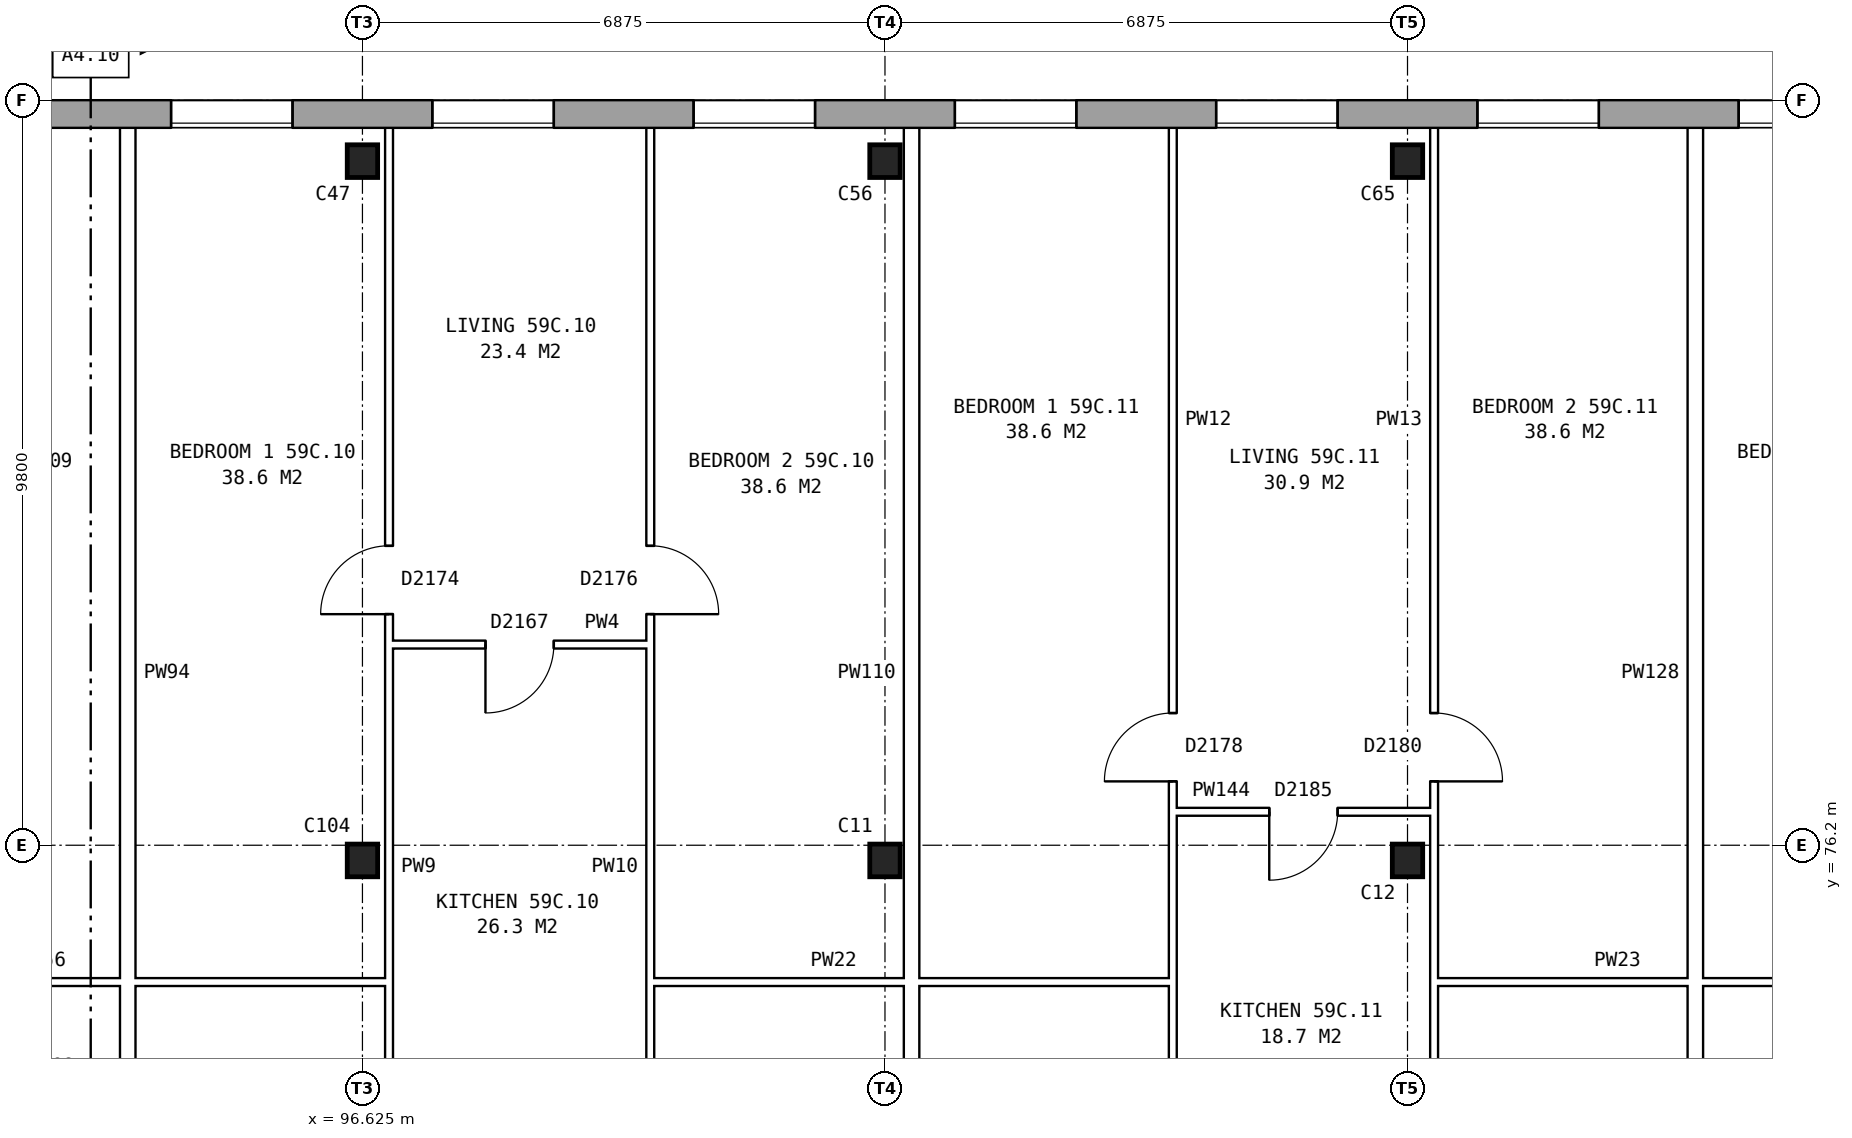
"""IFC4 building model, lengths in metres.
Left out: names, types, materials, properties, quantities, classifications, styles, units other than length and angle.
Written with IfcOpenShell. Run it as: python <this file> out.ifc"""

import sys

from ifc_helpers import new_model, si_unit, direction, frame, frame_2d, origin, origin_2d, place, context, subcontext, project, spatial, rectangle, i_section, extrude, element, fill, save


model = new_model("IFC4")
c1 = context("Model", 3, precision=1e-05, world=origin(), true_north=direction((0.0, 1.0)))
c2 = subcontext(c1, "Body", "Model", "MODEL_VIEW")
j1 = project(units=[si_unit("LENGTHUNIT", "METRE"), si_unit("PLANEANGLEUNIT", "RADIAN")], contexts=[c1])
p1 = place(None, origin())
s1 = spatial("IfcSite", under=j1, at=p1, CompositionType="ELEMENT")
p2 = place(p1, origin())
s2 = spatial("IfcBuilding", under=s1, at=p2, CompositionType="ELEMENT")
p3 = place(p2, frame((0.0, 0.0, 209.0)))
s3 = spatial("IfcBuildingStorey", under=s2, at=p3, CompositionType="ELEMENT", Elevation=209.0)
for number, where, z_axis, x_axis in (
    (1, (96.625, 76.0, 0.0), (0.0, 0.0, 1.0), (1.0, 0.0, 0.0)),
    (2, (103.5, 76.0, 0.0), (0.0, 0.0, 1.0), (1.0, 0.0, 0.0)),
    (3, (110.375, 76.0, 0.0), (0.0, 0.0, 1.0), (1.0, 0.0, 0.0)),
    (4, (96.625, 85.2, 0.0), (0.0, 0.0, 1.0), (1.0, 0.0, 0.0)),
    (5, (103.5, 85.2, 0.0), (0.0, 0.0, 1.0), (1.0, 0.0, 0.0)),
    (6, (110.375, 85.2, 0.0), (0.0, 0.0, 1.0), (1.0, 0.0, 0.0)),
):
    element("IfcColumn", number, at=place(p3, frame(where, z_axis=z_axis, x_axis=x_axis)), inside=s3, PredefinedType="COLUMN", context=c2, shape_type="SweptSolid", body=[
        extrude(i_section(OverallWidth=0.4, OverallDepth=0.43, WebThickness=0.04, FlangeThickness=0.04, at=origin_2d()), origin(), (0.0, 0.0, 1.0), 2.85),
    ])
p4 = place(p3, frame((131.05, 85.82, 0.0), z_axis=(0.0, 0.0, 1.0), x_axis=(-1.0, 0.0, 0.0)))
e7 = element("IfcWall", 7, at=p4, inside=s3, PredefinedType="STANDARD", context=c2, shape_type="SweptSolid", body=[
    extrude(rectangle(XDim=55.1, YDim=0.36, at=frame_2d((27.55, 0.0))), origin(), (0.0, 0.0, 1.0), 2.85),
])
p5 = place(p4, frame((0.969, 0.0, 0.8)))
e8 = element("IfcOpeningElement", 8, at=p5, cuts=e7, PredefinedType="OPENING", context=c2, shape_type="SweptSolid", body=[
    extrude(rectangle(XDim=1.6, YDim=1.8, at=frame_2d((0.8, 0.9))), frame((0.0, 0.19, 0.0), z_axis=(0.0, -1.0, 0.0), x_axis=(1.0, 0.0, 0.0)), (0.0, 0.0, 1.0), 0.38),
])
p6 = place(p4, frame((4.406, 0.0, 0.8)))
e9 = element("IfcOpeningElement", 9, at=p6, cuts=e7, PredefinedType="OPENING", context=c2, shape_type="SweptSolid", body=[
    extrude(rectangle(XDim=1.6, YDim=1.8, at=frame_2d((0.8, 0.9))), frame((0.0, 0.19, 0.0), z_axis=(0.0, -1.0, 0.0), x_axis=(1.0, 0.0, 0.0)), (0.0, 0.0, 1.0), 0.38),
])
p7 = place(p4, frame((7.844, 0.0, 0.8)))
e10 = element("IfcOpeningElement", 10, at=p7, cuts=e7, PredefinedType="OPENING", context=c2, shape_type="SweptSolid", body=[
    extrude(rectangle(XDim=1.6, YDim=1.8, at=frame_2d((0.8, 0.9))), frame((0.0, 0.19, 0.0), z_axis=(0.0, -1.0, 0.0), x_axis=(1.0, 0.0, 0.0)), (0.0, 0.0, 1.0), 0.38),
])
p8 = place(p4, frame((11.281, 0.0, 0.8)))
e11 = element("IfcOpeningElement", 11, at=p8, cuts=e7, PredefinedType="OPENING", context=c2, shape_type="SweptSolid", body=[
    extrude(rectangle(XDim=1.6, YDim=1.8, at=frame_2d((0.8, 0.9))), frame((0.0, 0.19, 0.0), z_axis=(0.0, -1.0, 0.0), x_axis=(1.0, 0.0, 0.0)), (0.0, 0.0, 1.0), 0.38),
])
p9 = place(p4, frame((14.719, 0.0, 0.8)))
e12 = element("IfcOpeningElement", 12, at=p9, cuts=e7, PredefinedType="OPENING", context=c2, shape_type="SweptSolid", body=[
    extrude(rectangle(XDim=1.6, YDim=1.8, at=frame_2d((0.8, 0.9))), frame((0.0, 0.19, 0.0), z_axis=(0.0, -1.0, 0.0), x_axis=(1.0, 0.0, 0.0)), (0.0, 0.0, 1.0), 0.38),
])
p10 = place(p4, frame((18.156, 0.0, 0.8)))
e13 = element("IfcOpeningElement", 13, at=p10, cuts=e7, PredefinedType="OPENING", context=c2, shape_type="SweptSolid", body=[
    extrude(rectangle(XDim=1.6, YDim=1.8, at=frame_2d((0.8, 0.9))), frame((0.0, 0.19, 0.0), z_axis=(0.0, -1.0, 0.0), x_axis=(1.0, 0.0, 0.0)), (0.0, 0.0, 1.0), 0.38),
])
p11 = place(p4, frame((21.594, 0.0, 0.8)))
e14 = element("IfcOpeningElement", 14, at=p11, cuts=e7, PredefinedType="OPENING", context=c2, shape_type="SweptSolid", body=[
    extrude(rectangle(XDim=1.6, YDim=1.8, at=frame_2d((0.8, 0.9))), frame((0.0, 0.19, 0.0), z_axis=(0.0, -1.0, 0.0), x_axis=(1.0, 0.0, 0.0)), (0.0, 0.0, 1.0), 0.38),
])
p12 = place(p4, frame((25.031, 0.0, 0.8)))
e15 = element("IfcOpeningElement", 15, at=p12, cuts=e7, PredefinedType="OPENING", context=c2, shape_type="SweptSolid", body=[
    extrude(rectangle(XDim=1.6, YDim=1.8, at=frame_2d((0.8, 0.9))), frame((0.0, 0.19, 0.0), z_axis=(0.0, -1.0, 0.0), x_axis=(1.0, 0.0, 0.0)), (0.0, 0.0, 1.0), 0.38),
])
p13 = place(p4, frame((28.469, 0.0, 0.8)))
e16 = element("IfcOpeningElement", 16, at=p13, cuts=e7, PredefinedType="OPENING", context=c2, shape_type="SweptSolid", body=[
    extrude(rectangle(XDim=1.6, YDim=1.8, at=frame_2d((0.8, 0.9))), frame((0.0, 0.19, 0.0), z_axis=(0.0, -1.0, 0.0), x_axis=(1.0, 0.0, 0.0)), (0.0, 0.0, 1.0), 0.38),
])
p14 = place(p4, frame((31.906, 0.0, 0.8)))
e17 = element("IfcOpeningElement", 17, at=p14, cuts=e7, PredefinedType="OPENING", context=c2, shape_type="SweptSolid", body=[
    extrude(rectangle(XDim=1.6, YDim=1.8, at=frame_2d((0.8, 0.9))), frame((0.0, 0.19, 0.0), z_axis=(0.0, -1.0, 0.0), x_axis=(1.0, 0.0, 0.0)), (0.0, 0.0, 1.0), 0.38),
])
p15 = place(p4, frame((35.344, 0.0, 0.8)))
e18 = element("IfcOpeningElement", 18, at=p15, cuts=e7, PredefinedType="OPENING", context=c2, shape_type="SweptSolid", body=[
    extrude(rectangle(XDim=1.6, YDim=1.8, at=frame_2d((0.8, 0.9))), frame((0.0, 0.19, 0.0), z_axis=(0.0, -1.0, 0.0), x_axis=(1.0, 0.0, 0.0)), (0.0, 0.0, 1.0), 0.38),
])
p16 = place(p4, frame((38.781, 0.0, 0.8)))
e19 = element("IfcOpeningElement", 19, at=p16, cuts=e7, PredefinedType="OPENING", context=c2, shape_type="SweptSolid", body=[
    extrude(rectangle(XDim=1.6, YDim=1.8, at=frame_2d((0.8, 0.9))), frame((0.0, 0.19, 0.0), z_axis=(0.0, -1.0, 0.0), x_axis=(1.0, 0.0, 0.0)), (0.0, 0.0, 1.0), 0.38),
])
p17 = place(p4, frame((42.219, 0.0, 0.8)))
e20 = element("IfcOpeningElement", 20, at=p17, cuts=e7, PredefinedType="OPENING", context=c2, shape_type="SweptSolid", body=[
    extrude(rectangle(XDim=1.6, YDim=1.8, at=frame_2d((0.8, 0.9))), frame((0.0, 0.19, 0.0), z_axis=(0.0, -1.0, 0.0), x_axis=(1.0, 0.0, 0.0)), (0.0, 0.0, 1.0), 0.38),
])
p18 = place(p4, frame((45.656, 0.0, 0.8)))
e21 = element("IfcOpeningElement", 21, at=p18, cuts=e7, PredefinedType="OPENING", context=c2, shape_type="SweptSolid", body=[
    extrude(rectangle(XDim=1.6, YDim=1.8, at=frame_2d((0.8, 0.9))), frame((0.0, 0.19, 0.0), z_axis=(0.0, -1.0, 0.0), x_axis=(1.0, 0.0, 0.0)), (0.0, 0.0, 1.0), 0.38),
])
p19 = place(p4, frame((49.094, 0.0, 0.8)))
e22 = element("IfcOpeningElement", 22, at=p19, cuts=e7, PredefinedType="OPENING", context=c2, shape_type="SweptSolid", body=[
    extrude(rectangle(XDim=1.6, YDim=1.8, at=frame_2d((0.8, 0.9))), frame((0.0, 0.19, 0.0), z_axis=(0.0, -1.0, 0.0), x_axis=(1.0, 0.0, 0.0)), (0.0, 0.0, 1.0), 0.38),
])
p20 = place(p4, frame((52.531, 0.0, 0.8)))
e23 = element("IfcOpeningElement", 23, at=p20, cuts=e7, PredefinedType="OPENING", context=c2, shape_type="SweptSolid", body=[
    extrude(rectangle(XDim=1.6, YDim=1.8, at=frame_2d((0.8, 0.9))), frame((0.0, 0.19, 0.0), z_axis=(0.0, -1.0, 0.0), x_axis=(1.0, 0.0, 0.0)), (0.0, 0.0, 1.0), 0.38),
])
for number, where, z_axis, x_axis in (
    (24, (90.1, 74.4, 0.0), (0.0, 0.0, 1.0), (1.0, 0.0, 0.0)),
    (25, (100.412, 74.4, 0.0), (0.0, 0.0, 1.0), (1.0, 0.0, 0.0)),
    (26, (110.725, 74.4, 0.0), (0.0, 0.0, 1.0), (1.0, 0.0, 0.0)),
):
    element("IfcWall", number, at=place(p3, frame(where, z_axis=z_axis, x_axis=x_axis)), inside=s3, PredefinedType="PARTITIONING", context=c2, shape_type="SweptSolid", body=[
        extrude(rectangle(XDim=6.875, YDim=0.1, at=frame_2d((3.438, 0.0))), origin(), (0.0, 0.0, 1.0), 2.85),
    ])
p21 = place(p3, frame((107.287, 76.64, 0.0), z_axis=(0.0, 0.0, 1.0), x_axis=(1.0, 0.0, 0.0)))
e27 = element("IfcWall", 27, at=p21, inside=s3, PredefinedType="PARTITIONING", context=c2, shape_type="SweptSolid", body=[
    extrude(rectangle(XDim=3.438, YDim=0.1, at=frame_2d((1.719, 0.0))), origin(), (0.0, 0.0, 1.0), 2.85),
])
p22 = place(p21, frame((1.269, 0.0, 0.0)))
e28 = element("IfcOpeningElement", 28, at=p22, cuts=e27, PredefinedType="OPENING", context=c2, shape_type="SweptSolid", body=[
    extrude(rectangle(XDim=0.9, YDim=2.1, at=frame_2d((0.45, 1.05))), frame((0.0, 0.06, 0.0), z_axis=(0.0, -1.0, 0.0), x_axis=(1.0, 0.0, 0.0)), (0.0, 0.0, 1.0), 0.12),
])
p23 = place(p3, frame((96.975, 78.84, 0.0), z_axis=(0.0, 0.0, 1.0), x_axis=(1.0, 0.0, 0.0)))
e29 = element("IfcWall", 29, at=p23, inside=s3, PredefinedType="PARTITIONING", context=c2, shape_type="SweptSolid", body=[
    extrude(rectangle(XDim=3.437, YDim=0.1, at=frame_2d((1.719, 0.0))), origin(), (0.0, 0.0, 1.0), 2.85),
])
p24 = place(p23, frame((1.269, 0.0, 0.0)))
e30 = element("IfcOpeningElement", 30, at=p24, cuts=e29, PredefinedType="OPENING", context=c2, shape_type="SweptSolid", body=[
    extrude(rectangle(XDim=0.9, YDim=2.1, at=frame_2d((0.45, 1.05))), frame((0.0, 0.06, 0.0), z_axis=(0.0, -1.0, 0.0), x_axis=(1.0, 0.0, 0.0)), (0.0, 0.0, 1.0), 0.12),
])
p25 = place(p3, frame((93.537, 71.3, 0.0), z_axis=(0.0, 0.0, 1.0), x_axis=(0.0, 1.0, 0.0)))
e31 = element("IfcWall", 31, at=p25, inside=s3, PredefinedType="PARTITIONING", context=c2, shape_type="SweptSolid", body=[
    extrude(rectangle(XDim=14.34, YDim=0.2, at=frame_2d((7.17, 0.0))), origin(), (0.0, 0.0, 1.0), 2.85),
])
p26 = place(p3, frame((96.975, 71.3, 0.0), z_axis=(0.0, 0.0, 1.0), x_axis=(0.0, 1.0, 0.0)))
e32 = element("IfcWall", 32, at=p26, inside=s3, PredefinedType="PARTITIONING", context=c2, shape_type="SweptSolid", body=[
    extrude(rectangle(XDim=14.34, YDim=0.1, at=frame_2d((7.17, 0.0))), origin(), (0.0, 0.0, 1.0), 2.85),
])
p27 = place(p26, frame((7.94, 0.0, 0.0)))
e33 = element("IfcOpeningElement", 33, at=p27, cuts=e32, PredefinedType="OPENING", context=c2, shape_type="SweptSolid", body=[
    extrude(rectangle(XDim=0.9, YDim=2.1, at=frame_2d((0.45, 1.05))), frame((0.0, 0.06, 0.0), z_axis=(0.0, -1.0, 0.0), x_axis=(1.0, 0.0, 0.0)), (0.0, 0.0, 1.0), 0.12),
])
p28 = place(p26, frame((0.4, 0.0, 0.0)))
e34 = element("IfcOpeningElement", 34, at=p28, cuts=e32, PredefinedType="OPENING", context=c2, shape_type="SweptSolid", body=[
    extrude(rectangle(XDim=0.9, YDim=2.1, at=frame_2d((0.45, 1.05))), frame((0.0, 0.06, 0.0), z_axis=(0.0, -1.0, 0.0), x_axis=(1.0, 0.0, 0.0)), (0.0, 0.0, 1.0), 0.12),
])
p29 = place(p3, frame((100.412, 71.3, 0.0), z_axis=(0.0, 0.0, 1.0), x_axis=(0.0, 1.0, 0.0)))
e35 = element("IfcWall", 35, at=p29, inside=s3, PredefinedType="PARTITIONING", context=c2, shape_type="SweptSolid", body=[
    extrude(rectangle(XDim=14.34, YDim=0.1, at=frame_2d((7.17, 0.0))), origin(), (0.0, 0.0, 1.0), 2.85),
])
p30 = place(p29, frame((7.94, 0.0, 0.0)))
e36 = element("IfcOpeningElement", 36, at=p30, cuts=e35, PredefinedType="OPENING", context=c2, shape_type="SweptSolid", body=[
    extrude(rectangle(XDim=0.9, YDim=2.1, at=frame_2d((0.45, 1.05))), frame((0.0, 0.06, 0.0), z_axis=(0.0, -1.0, 0.0), x_axis=(1.0, 0.0, 0.0)), (0.0, 0.0, 1.0), 0.12),
])
p31 = place(p29, frame((0.4, 0.0, 0.0)))
e37 = element("IfcOpeningElement", 37, at=p31, cuts=e35, PredefinedType="OPENING", context=c2, shape_type="SweptSolid", body=[
    extrude(rectangle(XDim=0.9, YDim=2.1, at=frame_2d((0.45, 1.05))), frame((0.0, 0.06, 0.0), z_axis=(0.0, -1.0, 0.0), x_axis=(1.0, 0.0, 0.0)), (0.0, 0.0, 1.0), 0.12),
])
p32 = place(p3, frame((103.85, 71.3, 0.0), z_axis=(0.0, 0.0, 1.0), x_axis=(0.0, 1.0, 0.0)))
e38 = element("IfcWall", 38, at=p32, inside=s3, PredefinedType="PARTITIONING", context=c2, shape_type="SweptSolid", body=[
    extrude(rectangle(XDim=14.34, YDim=0.2, at=frame_2d((7.17, 0.0))), origin(), (0.0, 0.0, 1.0), 2.85),
])
p33 = place(p3, frame((107.287, 71.3, 0.0), z_axis=(0.0, 0.0, 1.0), x_axis=(0.0, 1.0, 0.0)))
e39 = element("IfcWall", 39, at=p33, inside=s3, PredefinedType="PARTITIONING", context=c2, shape_type="SweptSolid", body=[
    extrude(rectangle(XDim=14.34, YDim=0.1, at=frame_2d((7.17, 0.0))), origin(), (0.0, 0.0, 1.0), 2.85),
])
p34 = place(p33, frame((5.74, 0.0, 0.0)))
e40 = element("IfcOpeningElement", 40, at=p34, cuts=e39, PredefinedType="OPENING", context=c2, shape_type="SweptSolid", body=[
    extrude(rectangle(XDim=0.9, YDim=2.1, at=frame_2d((0.45, 1.05))), frame((0.0, 0.06, 0.0), z_axis=(0.0, -1.0, 0.0), x_axis=(1.0, 0.0, 0.0)), (0.0, 0.0, 1.0), 0.12),
])
p35 = place(p33, frame((0.4, 0.0, 0.0)))
e41 = element("IfcOpeningElement", 41, at=p35, cuts=e39, PredefinedType="OPENING", context=c2, shape_type="SweptSolid", body=[
    extrude(rectangle(XDim=0.9, YDim=2.1, at=frame_2d((0.45, 1.05))), frame((0.0, 0.06, 0.0), z_axis=(0.0, -1.0, 0.0), x_axis=(1.0, 0.0, 0.0)), (0.0, 0.0, 1.0), 0.12),
])
p36 = place(p3, frame((110.725, 71.3, 0.0), z_axis=(0.0, 0.0, 1.0), x_axis=(0.0, 1.0, 0.0)))
e42 = element("IfcWall", 42, at=p36, inside=s3, PredefinedType="PARTITIONING", context=c2, shape_type="SweptSolid", body=[
    extrude(rectangle(XDim=14.34, YDim=0.1, at=frame_2d((7.17, 0.0))), origin(), (0.0, 0.0, 1.0), 2.85),
])
p37 = place(p36, frame((5.74, 0.0, 0.0)))
e43 = element("IfcOpeningElement", 43, at=p37, cuts=e42, PredefinedType="OPENING", context=c2, shape_type="SweptSolid", body=[
    extrude(rectangle(XDim=0.9, YDim=2.1, at=frame_2d((0.45, 1.05))), frame((0.0, 0.06, 0.0), z_axis=(0.0, -1.0, 0.0), x_axis=(1.0, 0.0, 0.0)), (0.0, 0.0, 1.0), 0.12),
])
p38 = place(p36, frame((0.4, 0.0, 0.0)))
e44 = element("IfcOpeningElement", 44, at=p38, cuts=e42, PredefinedType="OPENING", context=c2, shape_type="SweptSolid", body=[
    extrude(rectangle(XDim=0.9, YDim=2.1, at=frame_2d((0.45, 1.05))), frame((0.0, 0.06, 0.0), z_axis=(0.0, -1.0, 0.0), x_axis=(1.0, 0.0, 0.0)), (0.0, 0.0, 1.0), 0.12),
])
p39 = place(p3, frame((114.162, 71.3, 0.0), z_axis=(0.0, 0.0, 1.0), x_axis=(0.0, 1.0, 0.0)))
e45 = element("IfcWall", 45, at=p39, inside=s3, PredefinedType="PARTITIONING", context=c2, shape_type="SweptSolid", body=[
    extrude(rectangle(XDim=14.34, YDim=0.2, at=frame_2d((7.17, 0.0))), origin(), (0.0, 0.0, 1.0), 2.85),
])
p40 = place(p9, origin())
e46 = element("IfcWindow", 46, at=p40, inside=s3, PartitioningType="SINGLE_PANEL", PredefinedType="WINDOW", context=c2, shape_type="SweptSolid", body=[
    extrude(rectangle(XDim=1.6, YDim=1.8, at=frame_2d((0.8, 0.9))), frame((0.0, 0.15, 0.0), z_axis=(0.0, -1.0, 0.0), x_axis=(1.0, 0.0, 0.0)), (0.0, 0.0, 1.0), 0.06),
])
fill(e12, e46)
p41 = place(p10, origin())
e47 = element("IfcWindow", 47, at=p41, inside=s3, PartitioningType="SINGLE_PANEL", PredefinedType="WINDOW", context=c2, shape_type="SweptSolid", body=[
    extrude(rectangle(XDim=1.6, YDim=1.8, at=frame_2d((0.8, 0.9))), frame((0.0, 0.15, 0.0), z_axis=(0.0, -1.0, 0.0), x_axis=(1.0, 0.0, 0.0)), (0.0, 0.0, 1.0), 0.06),
])
fill(e13, e47)
p42 = place(p11, origin())
e48 = element("IfcWindow", 48, at=p42, inside=s3, PartitioningType="SINGLE_PANEL", PredefinedType="WINDOW", context=c2, shape_type="SweptSolid", body=[
    extrude(rectangle(XDim=1.6, YDim=1.8, at=frame_2d((0.8, 0.9))), frame((0.0, 0.15, 0.0), z_axis=(0.0, -1.0, 0.0), x_axis=(1.0, 0.0, 0.0)), (0.0, 0.0, 1.0), 0.06),
])
fill(e14, e48)
p43 = place(p12, origin())
e49 = element("IfcWindow", 49, at=p43, inside=s3, PartitioningType="SINGLE_PANEL", PredefinedType="WINDOW", context=c2, shape_type="SweptSolid", body=[
    extrude(rectangle(XDim=1.6, YDim=1.8, at=frame_2d((0.8, 0.9))), frame((0.0, 0.15, 0.0), z_axis=(0.0, -1.0, 0.0), x_axis=(1.0, 0.0, 0.0)), (0.0, 0.0, 1.0), 0.06),
])
fill(e15, e49)
p44 = place(p13, origin())
e50 = element("IfcWindow", 50, at=p44, inside=s3, PartitioningType="SINGLE_PANEL", PredefinedType="WINDOW", context=c2, shape_type="SweptSolid", body=[
    extrude(rectangle(XDim=1.6, YDim=1.8, at=frame_2d((0.8, 0.9))), frame((0.0, 0.15, 0.0), z_axis=(0.0, -1.0, 0.0), x_axis=(1.0, 0.0, 0.0)), (0.0, 0.0, 1.0), 0.06),
])
fill(e16, e50)
p45 = place(p14, origin())
e51 = element("IfcWindow", 51, at=p45, inside=s3, PartitioningType="SINGLE_PANEL", PredefinedType="WINDOW", context=c2, shape_type="SweptSolid", body=[
    extrude(rectangle(XDim=1.6, YDim=1.8, at=frame_2d((0.8, 0.9))), frame((0.0, 0.15, 0.0), z_axis=(0.0, -1.0, 0.0), x_axis=(1.0, 0.0, 0.0)), (0.0, 0.0, 1.0), 0.06),
])
fill(e17, e51)
p46 = place(p15, origin())
e52 = element("IfcWindow", 52, at=p46, inside=s3, PartitioningType="SINGLE_PANEL", PredefinedType="WINDOW", context=c2, shape_type="SweptSolid", body=[
    extrude(rectangle(XDim=1.6, YDim=1.8, at=frame_2d((0.8, 0.9))), frame((0.0, 0.15, 0.0), z_axis=(0.0, -1.0, 0.0), x_axis=(1.0, 0.0, 0.0)), (0.0, 0.0, 1.0), 0.06),
])
fill(e18, e52)
p47 = place(p27, origin())
e53 = element("IfcDoor", 53, at=p47, inside=s3, OperationType="SINGLE_SWING_LEFT", PredefinedType="DOOR", context=c2, shape_type="SweptSolid", body=[
    extrude(rectangle(XDim=0.9, YDim=2.1, at=frame_2d((0.45, 1.05))), frame((0.0, 0.025, 0.0), z_axis=(0.0, -1.0, 0.0), x_axis=(1.0, 0.0, 0.0)), (0.0, 0.0, 1.0), 0.05),
])
fill(e33, e53)
p48 = place(p30, frame((0.9, 0.0, 0.0), z_axis=(0.0, 0.0, 1.0), x_axis=(-1.0, 0.0, 0.0)))
e54 = element("IfcDoor", 54, at=p48, inside=s3, OperationType="SINGLE_SWING_RIGHT", PredefinedType="DOOR", context=c2, shape_type="SweptSolid", body=[
    extrude(rectangle(XDim=0.9, YDim=2.1, at=frame_2d((0.45, 1.05))), frame((0.0, 0.025, 0.0), z_axis=(0.0, -1.0, 0.0), x_axis=(1.0, 0.0, 0.0)), (0.0, 0.0, 1.0), 0.05),
])
fill(e36, e54)
p49 = place(p24, frame((0.9, 0.0, 0.0), z_axis=(0.0, 0.0, 1.0), x_axis=(-1.0, 0.0, 0.0)))
e55 = element("IfcDoor", 55, at=p49, inside=s3, OperationType="SINGLE_SWING_RIGHT", PredefinedType="DOOR", context=c2, shape_type="SweptSolid", body=[
    extrude(rectangle(XDim=0.9, YDim=2.1, at=frame_2d((0.45, 1.05))), frame((0.0, 0.025, 0.0), z_axis=(0.0, -1.0, 0.0), x_axis=(1.0, 0.0, 0.0)), (0.0, 0.0, 1.0), 0.05),
])
fill(e30, e55)
p50 = place(p34, origin())
e56 = element("IfcDoor", 56, at=p50, inside=s3, OperationType="SINGLE_SWING_LEFT", PredefinedType="DOOR", context=c2, shape_type="SweptSolid", body=[
    extrude(rectangle(XDim=0.9, YDim=2.1, at=frame_2d((0.45, 1.05))), frame((0.0, 0.025, 0.0), z_axis=(0.0, -1.0, 0.0), x_axis=(1.0, 0.0, 0.0)), (0.0, 0.0, 1.0), 0.05),
])
fill(e40, e56)
p51 = place(p37, frame((0.9, 0.0, 0.0), z_axis=(0.0, 0.0, 1.0), x_axis=(-1.0, 0.0, 0.0)))
e57 = element("IfcDoor", 57, at=p51, inside=s3, OperationType="SINGLE_SWING_RIGHT", PredefinedType="DOOR", context=c2, shape_type="SweptSolid", body=[
    extrude(rectangle(XDim=0.9, YDim=2.1, at=frame_2d((0.45, 1.05))), frame((0.0, 0.025, 0.0), z_axis=(0.0, -1.0, 0.0), x_axis=(1.0, 0.0, 0.0)), (0.0, 0.0, 1.0), 0.05),
])
fill(e43, e57)
p52 = place(p22, frame((0.9, 0.0, 0.0), z_axis=(0.0, 0.0, 1.0), x_axis=(-1.0, 0.0, 0.0)))
e58 = element("IfcDoor", 58, at=p52, inside=s3, OperationType="SINGLE_SWING_RIGHT", PredefinedType="DOOR", context=c2, shape_type="SweptSolid", body=[
    extrude(rectangle(XDim=0.9, YDim=2.1, at=frame_2d((0.45, 1.05))), frame((0.0, 0.025, 0.0), z_axis=(0.0, -1.0, 0.0), x_axis=(1.0, 0.0, 0.0)), (0.0, 0.0, 1.0), 0.05),
])
fill(e28, e58)
save(model, sys.argv[1])
